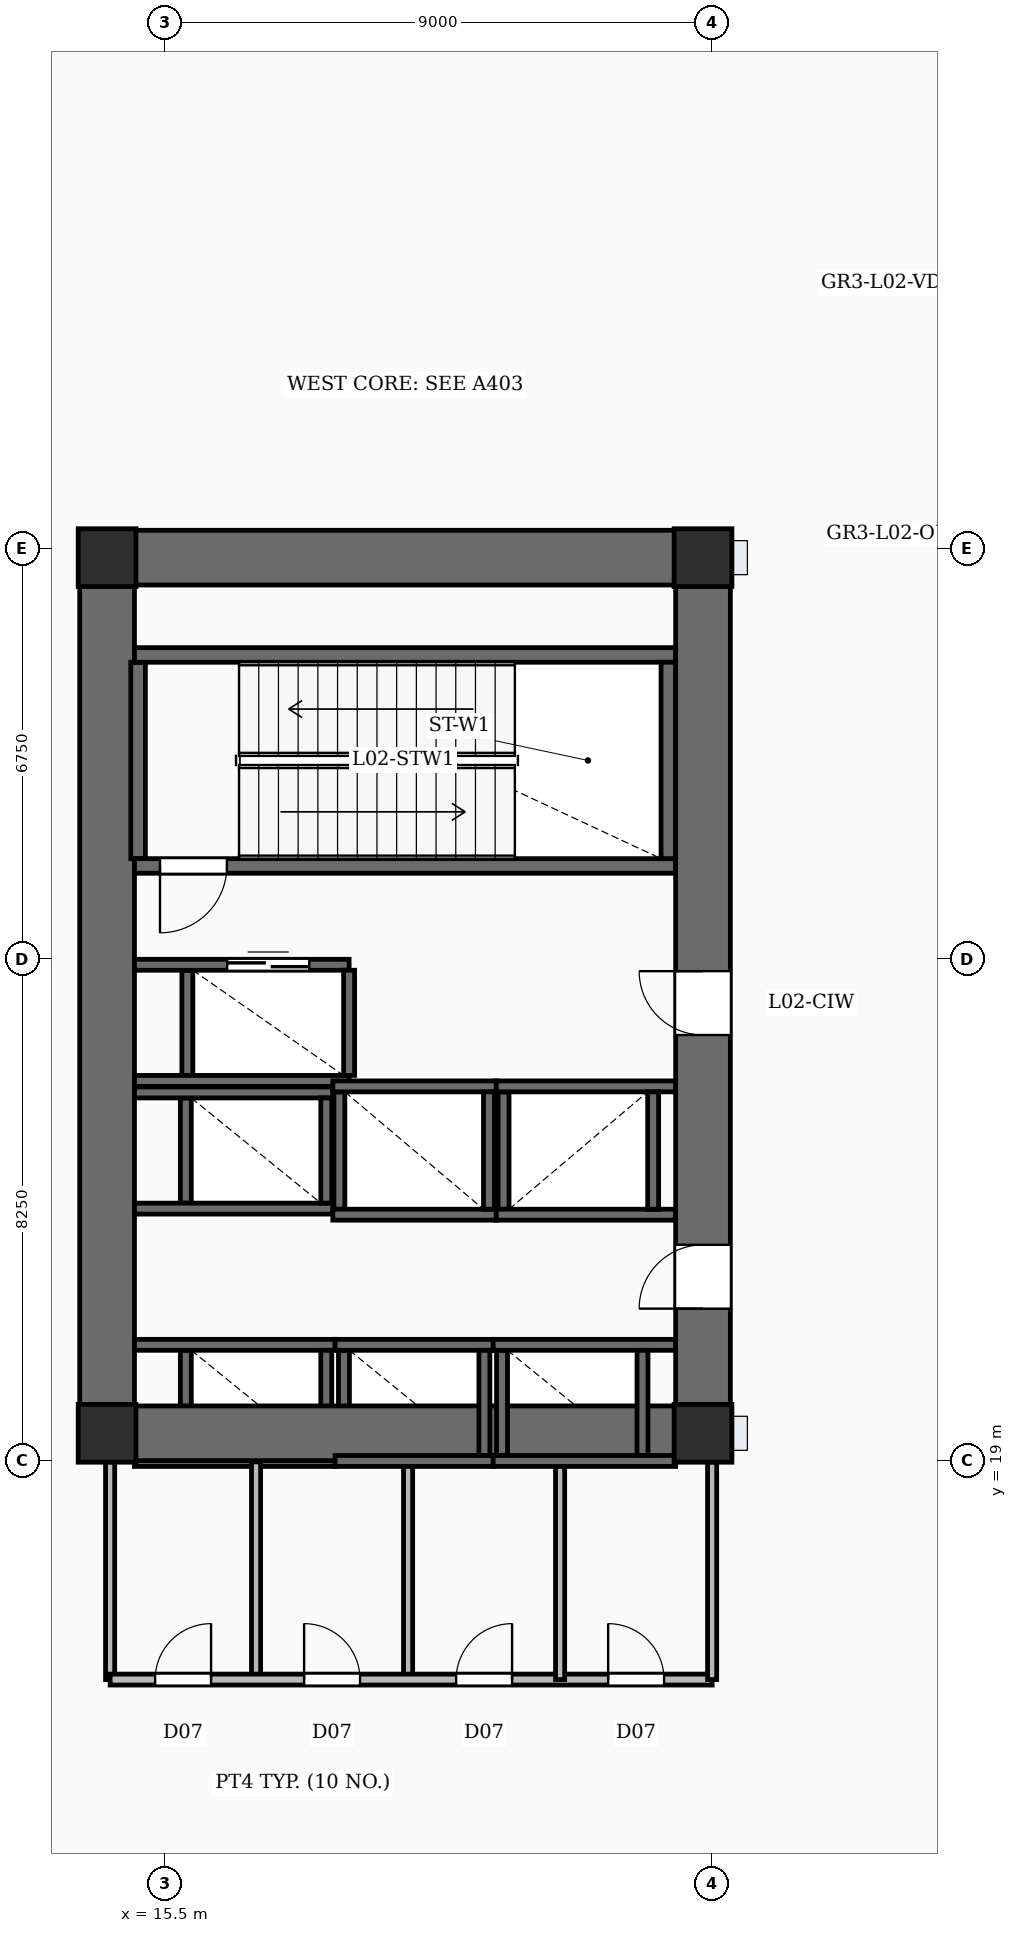
"""IFC4 building model, lengths in metres.
Left out: names, types, materials, properties, quantities, classifications, styles, units other than length and angle.
Written with IfcOpenShell. Run it as: python <this file> out.ifc"""

import sys

from ifc_helpers import new_model, si_unit, direction, frame, frame_2d, origin, origin_2d, place, context, subcontext, project, spatial, rectangle, extrude, element, fill, save


model = new_model("IFC4")
c1 = context("Model", 3, precision=1e-05, world=origin(), true_north=direction((0.0, 1.0)))
c2 = subcontext(c1, "Body", "Model", "MODEL_VIEW")
j1 = project(units=[si_unit("LENGTHUNIT", "METRE"), si_unit("PLANEANGLEUNIT", "RADIAN")], contexts=[c1])
p1 = place(None, origin())
s1 = spatial("IfcSite", under=j1, at=p1, CompositionType="ELEMENT")
p2 = place(p1, origin())
s2 = spatial("IfcBuilding", under=s1, at=p2, CompositionType="ELEMENT")
p3 = place(p2, frame((0.0, 0.0, 13.0)))
s3 = spatial("IfcBuildingStorey", under=s2, at=p3, CompositionType="ELEMENT", Elevation=13.0)
p4 = place(p3, frame((14.55, 19.0, -0.35), z_axis=(0.0, 0.0, 1.0), x_axis=(0.0, 1.0, 0.0)))
e1 = element("IfcWall", 1, at=p4, inside=s3, PredefinedType="SHEAR", context=c2, shape_type="SweptSolid", body=[
    extrude(rectangle(XDim=15.3, YDim=0.9, at=frame_2d((7.65, 0.0))), origin(), (0.0, 0.0, 1.0), 5.0),
])
p5 = place(p3, frame((24.35, 19.0, -0.35), z_axis=(0.0, 0.0, 1.0), x_axis=(0.0, 1.0, 0.0)))
e2 = element("IfcWall", 2, at=p5, inside=s3, PredefinedType="SHEAR", context=c2, shape_type="SweptSolid", body=[
    extrude(rectangle(XDim=15.3, YDim=0.9, at=frame_2d((7.65, 0.0))), origin(), (0.0, 0.0, 1.0), 5.0),
])
p6 = place(p5, frame((2.5, 0.0, 0.35)))
e3 = element("IfcOpeningElement", 3, at=p6, cuts=e2, PredefinedType="OPENING", context=c2, shape_type="SweptSolid", body=[
    extrude(rectangle(XDim=1.05, YDim=2.15, at=frame_2d((0.525, 1.075))), frame((0.0, 0.46, 0.0), z_axis=(0.0, -1.0, 0.0), x_axis=(1.0, 0.0, 0.0)), (0.0, 0.0, 1.0), 0.92),
])
p7 = place(p5, frame((7.0, 0.0, 0.35)))
e4 = element("IfcOpeningElement", 4, at=p7, cuts=e2, PredefinedType="OPENING", context=c2, shape_type="SweptSolid", body=[
    extrude(rectangle(XDim=1.05, YDim=2.15, at=frame_2d((0.525, 1.075))), frame((0.0, 0.46, 0.0), z_axis=(0.0, -1.0, 0.0), x_axis=(1.0, 0.0, 0.0)), (0.0, 0.0, 1.0), 0.92),
])
for number, where, z_axis, x_axis in (
    (5, (15.0, 19.45, -0.35), (0.0, 0.0, 1.0), (1.0, 0.0, 0.0)),
    (6, (15.0, 33.85, -0.35), (0.0, 0.0, 1.0), (1.0, 0.0, 0.0)),
):
    element("IfcWall", number, at=place(p3, frame(where, z_axis=z_axis, x_axis=x_axis)), inside=s3, PredefinedType="SHEAR", context=c2, shape_type="SweptSolid", body=[
        extrude(rectangle(XDim=8.9, YDim=0.9, at=frame_2d((4.45, 0.0))), origin(), (0.0, 0.0, 1.0), 5.0),
    ])
for number, where, z_axis, x_axis in (
    (7, (14.55, 19.45, -0.35), (0.0, 0.0, 1.0), (1.0, 0.0, 0.0)),
    (8, (24.35, 19.45, -0.35), (0.0, 0.0, 1.0), (1.0, 0.0, 0.0)),
    (9, (14.55, 33.85, -0.35), (0.0, 0.0, 1.0), (1.0, 0.0, 0.0)),
    (10, (24.35, 33.85, -0.35), (0.0, 0.0, 1.0), (1.0, 0.0, 0.0)),
):
    element("IfcColumn", number, at=place(p3, frame(where, z_axis=z_axis, x_axis=x_axis)), inside=s3, PredefinedType="COLUMN", context=c2, shape_type="SweptSolid", body=[
        extrude(rectangle(XDim=0.95, YDim=0.95, at=origin_2d()), origin(), (0.0, 0.0, 1.0), 5.0),
    ])
p8 = place(p3, frame((23.9, 28.78, 0.0), z_axis=(0.0, 0.0, 1.0), x_axis=(-1.0, 0.0, 0.0)))
e11 = element("IfcWall", 11, at=p8, inside=s3, PredefinedType="SOLIDWALL", context=c2, shape_type="SweptSolid", body=[
    extrude(rectangle(XDim=8.9, YDim=0.24, at=frame_2d((4.45, 0.0))), origin(), (0.0, 0.0, 1.0), 4.65),
])
p9 = place(p8, frame((7.38, 0.0, 0.0)))
e12 = element("IfcOpeningElement", 12, at=p9, cuts=e11, PredefinedType="OPENING", context=c2, shape_type="SweptSolid", body=[
    extrude(rectangle(XDim=1.1, YDim=2.15, at=frame_2d((0.55, 1.075))), frame((0.0, 0.13, 0.0), z_axis=(0.0, -1.0, 0.0), x_axis=(1.0, 0.0, 0.0)), (0.0, 0.0, 1.0), 0.26),
])
p10 = place(p3, frame((15.0, 32.25, 0.0), z_axis=(0.0, 0.0, 1.0), x_axis=(1.0, 0.0, 0.0)))
e13 = element("IfcWall", 13, at=p10, inside=s3, PredefinedType="SOLIDWALL", context=c2, shape_type="SweptSolid", body=[
    extrude(rectangle(XDim=8.9, YDim=0.24, at=frame_2d((4.45, 0.0))), origin(), (0.0, 0.0, 1.0), 4.65),
])
for number, where, z_axis, x_axis in (
    (14, (15.06, 28.9, 0.0), (0.0, 0.0, 1.0), (0.0, 1.0, 0.0)),
    (15, (23.78, 28.9, 0.0), (0.0, 0.0, 1.0), (0.0, 1.0, 0.0)),
):
    element("IfcWall", number, at=place(p3, frame(where, z_axis=z_axis, x_axis=x_axis)), inside=s3, PredefinedType="SOLIDWALL", context=c2, shape_type="SweptSolid", body=[
        extrude(rectangle(XDim=3.23, YDim=0.24, at=frame_2d((1.615, 0.0))), origin(), (0.0, 0.0, 1.0), 4.65),
    ])
for number, where, z_axis, x_axis in (
    (16, (15.0, 20.905, 0.0), (0.0, 0.0, 1.0), (1.0, 0.0, 0.0)),
    (17, (15.0, 18.995, 0.0), (0.0, 0.0, 1.0), (1.0, 0.0, 0.0)),
):
    element("IfcWall", number, at=place(p3, frame(where, z_axis=z_axis, x_axis=x_axis)), inside=s3, PredefinedType="SOLIDWALL", context=c2, shape_type="SweptSolid", body=[
        extrude(rectangle(XDim=3.3, YDim=0.18, at=frame_2d((1.65, 0.0))), origin(), (0.0, 0.0, 1.0), 4.65),
    ])
for number, where, z_axis, x_axis in (
    (18, (15.845, 19.085, 0.0), (0.0, 0.0, 1.0), (0.0, 1.0, 0.0)),
    (19, (18.155, 19.085, 0.0), (0.0, 0.0, 1.0), (0.0, 1.0, 0.0)),
):
    element("IfcWall", number, at=place(p3, frame(where, z_axis=z_axis, x_axis=x_axis)), inside=s3, PredefinedType="SOLIDWALL", context=c2, shape_type="SweptSolid", body=[
        extrude(rectangle(XDim=1.73, YDim=0.18, at=frame_2d((0.865, 0.0))), origin(), (0.0, 0.0, 1.0), 4.65),
    ])
for number, where, z_axis, x_axis in (
    (20, (18.3, 20.905, 0.0), (0.0, 0.0, 1.0), (1.0, 0.0, 0.0)),
    (21, (18.3, 18.995, 0.0), (0.0, 0.0, 1.0), (1.0, 0.0, 0.0)),
):
    element("IfcWall", number, at=place(p3, frame(where, z_axis=z_axis, x_axis=x_axis)), inside=s3, PredefinedType="SOLIDWALL", context=c2, shape_type="SweptSolid", body=[
        extrude(rectangle(XDim=2.6, YDim=0.18, at=frame_2d((1.3, 0.0))), origin(), (0.0, 0.0, 1.0), 4.65),
    ])
for number, where, z_axis, x_axis in (
    (22, (18.445, 19.085, 0.0), (0.0, 0.0, 1.0), (0.0, 1.0, 0.0)),
    (23, (20.755, 19.085, 0.0), (0.0, 0.0, 1.0), (0.0, 1.0, 0.0)),
):
    element("IfcWall", number, at=place(p3, frame(where, z_axis=z_axis, x_axis=x_axis)), inside=s3, PredefinedType="SOLIDWALL", context=c2, shape_type="SweptSolid", body=[
        extrude(rectangle(XDim=1.73, YDim=0.18, at=frame_2d((0.865, 0.0))), origin(), (0.0, 0.0, 1.0), 4.65),
    ])
for number, where, z_axis, x_axis in (
    (24, (20.9, 20.905, 0.0), (0.0, 0.0, 1.0), (1.0, 0.0, 0.0)),
    (25, (20.9, 18.995, 0.0), (0.0, 0.0, 1.0), (1.0, 0.0, 0.0)),
):
    element("IfcWall", number, at=place(p3, frame(where, z_axis=z_axis, x_axis=x_axis)), inside=s3, PredefinedType="SOLIDWALL", context=c2, shape_type="SweptSolid", body=[
        extrude(rectangle(XDim=3.0, YDim=0.18, at=frame_2d((1.5, 0.0))), origin(), (0.0, 0.0, 1.0), 4.65),
    ])
for number, where, z_axis, x_axis in (
    (26, (21.045, 19.085, 0.0), (0.0, 0.0, 1.0), (0.0, 1.0, 0.0)),
    (27, (23.355, 19.085, 0.0), (0.0, 0.0, 1.0), (0.0, 1.0, 0.0)),
):
    element("IfcWall", number, at=place(p3, frame(where, z_axis=z_axis, x_axis=x_axis)), inside=s3, PredefinedType="SOLIDWALL", context=c2, shape_type="SweptSolid", body=[
        extrude(rectangle(XDim=1.73, YDim=0.18, at=frame_2d((0.865, 0.0))), origin(), (0.0, 0.0, 1.0), 4.65),
    ])
for number, where, z_axis, x_axis in (
    (28, (15.0, 25.055, 0.0), (0.0, 0.0, 1.0), (1.0, 0.0, 0.0)),
    (29, (15.0, 23.145, 0.0), (0.0, 0.0, 1.0), (1.0, 0.0, 0.0)),
):
    element("IfcWall", number, at=place(p3, frame(where, z_axis=z_axis, x_axis=x_axis)), inside=s3, PredefinedType="SOLIDWALL", context=c2, shape_type="SweptSolid", body=[
        extrude(rectangle(XDim=3.262, YDim=0.18, at=frame_2d((1.631, 0.0))), origin(), (0.0, 0.0, 1.0), 4.65),
    ])
for number, where, z_axis, x_axis in (
    (30, (15.845, 23.235, 0.0), (0.0, 0.0, 1.0), (0.0, 1.0, 0.0)),
    (31, (18.155, 23.235, 0.0), (0.0, 0.0, 1.0), (0.0, 1.0, 0.0)),
):
    element("IfcWall", number, at=place(p3, frame(where, z_axis=z_axis, x_axis=x_axis)), inside=s3, PredefinedType="SOLIDWALL", context=c2, shape_type="SweptSolid", body=[
        extrude(rectangle(XDim=1.73, YDim=0.18, at=frame_2d((0.865, 0.0))), origin(), (0.0, 0.0, 1.0), 4.65),
    ])
for number, where, z_axis, x_axis in (
    (32, (18.262, 25.155, 0.0), (0.0, 0.0, 1.0), (1.0, 0.0, 0.0)),
    (33, (18.262, 23.045, 0.0), (0.0, 0.0, 1.0), (1.0, 0.0, 0.0)),
):
    element("IfcWall", number, at=place(p3, frame(where, z_axis=z_axis, x_axis=x_axis)), inside=s3, PredefinedType="SOLIDWALL", context=c2, shape_type="SweptSolid", body=[
        extrude(rectangle(XDim=2.688, YDim=0.18, at=frame_2d((1.344, 0.0))), origin(), (0.0, 0.0, 1.0), 4.65),
    ])
for number, where, z_axis, x_axis in (
    (34, (18.37, 23.135, 0.0), (0.0, 0.0, 1.0), (0.0, 1.0, 0.0)),
    (35, (20.83, 23.135, 0.0), (0.0, 0.0, 1.0), (0.0, 1.0, 0.0)),
):
    element("IfcWall", number, at=place(p3, frame(where, z_axis=z_axis, x_axis=x_axis)), inside=s3, PredefinedType="SOLIDWALL", context=c2, shape_type="SweptSolid", body=[
        extrude(rectangle(XDim=1.93, YDim=0.18, at=frame_2d((0.965, 0.0))), origin(), (0.0, 0.0, 1.0), 4.65),
    ])
for number, where, z_axis, x_axis in (
    (36, (20.95, 25.155, 0.0), (0.0, 0.0, 1.0), (1.0, 0.0, 0.0)),
    (37, (20.95, 23.045, 0.0), (0.0, 0.0, 1.0), (1.0, 0.0, 0.0)),
):
    element("IfcWall", number, at=place(p3, frame(where, z_axis=z_axis, x_axis=x_axis)), inside=s3, PredefinedType="SOLIDWALL", context=c2, shape_type="SweptSolid", body=[
        extrude(rectangle(XDim=2.95, YDim=0.18, at=frame_2d((1.475, 0.0))), origin(), (0.0, 0.0, 1.0), 4.65),
    ])
for number, where, z_axis, x_axis in (
    (38, (21.07, 23.135, 0.0), (0.0, 0.0, 1.0), (0.0, 1.0, 0.0)),
    (39, (23.53, 23.135, 0.0), (0.0, 0.0, 1.0), (0.0, 1.0, 0.0)),
):
    element("IfcWall", number, at=place(p3, frame(where, z_axis=z_axis, x_axis=x_axis)), inside=s3, PredefinedType="SOLIDWALL", context=c2, shape_type="SweptSolid", body=[
        extrude(rectangle(XDim=1.93, YDim=0.18, at=frame_2d((0.965, 0.0))), origin(), (0.0, 0.0, 1.0), 4.65),
    ])
p11 = place(p3, frame((15.0, 27.155, 0.0), z_axis=(0.0, 0.0, 1.0), x_axis=(1.0, 0.0, 0.0)))
e40 = element("IfcWall", 40, at=p11, inside=s3, PredefinedType="SOLIDWALL", context=c2, shape_type="SweptSolid", body=[
    extrude(rectangle(XDim=3.53, YDim=0.18, at=frame_2d((1.765, 0.0))), origin(), (0.0, 0.0, 1.0), 4.65),
])
p12 = place(p11, frame((1.525, 0.0, 0.0)))
e41 = element("IfcOpeningElement", 41, at=p12, cuts=e40, PredefinedType="OPENING", context=c2, shape_type="SweptSolid", body=[
    extrude(rectangle(XDim=1.35, YDim=2.3, at=frame_2d((0.675, 1.15))), frame((0.0, 0.1, 0.0), z_axis=(0.0, -1.0, 0.0), x_axis=(1.0, 0.0, 0.0)), (0.0, 0.0, 1.0), 0.2),
])
p13 = place(p3, frame((15.0, 25.245, 0.0), z_axis=(0.0, 0.0, 1.0), x_axis=(1.0, 0.0, 0.0)))
e42 = element("IfcWall", 42, at=p13, inside=s3, PredefinedType="SOLIDWALL", context=c2, shape_type="SweptSolid", body=[
    extrude(rectangle(XDim=3.53, YDim=0.18, at=frame_2d((1.765, 0.0))), origin(), (0.0, 0.0, 1.0), 4.65),
])
for number, where, z_axis, x_axis in (
    (43, (15.87, 25.335, 0.0), (0.0, 0.0, 1.0), (0.0, 1.0, 0.0)),
    (44, (18.53, 25.335, 0.0), (0.0, 0.0, 1.0), (0.0, 1.0, 0.0)),
):
    element("IfcWall", number, at=place(p3, frame(where, z_axis=z_axis, x_axis=x_axis)), inside=s3, PredefinedType="SOLIDWALL", context=c2, shape_type="SweptSolid", body=[
        extrude(rectangle(XDim=1.73, YDim=0.18, at=frame_2d((0.865, 0.0))), origin(), (0.0, 0.0, 1.0), 4.65),
    ])
for number, where, z_axis, x_axis in (
    (45, (17.0, 15.4, 0.0), (0.0, 0.0, 1.0), (0.0, 1.0, 0.0)),
    (46, (19.5, 15.4, 0.0), (0.0, 0.0, 1.0), (0.0, 1.0, 0.0)),
    (47, (22.0, 15.4, 0.0), (0.0, 0.0, 1.0), (0.0, 1.0, 0.0)),
):
    element("IfcWall", number, at=place(p3, frame(where, z_axis=z_axis, x_axis=x_axis)), inside=s3, PredefinedType="PARTITIONING", context=c2, shape_type="SweptSolid", body=[
        extrude(rectangle(XDim=3.58, YDim=0.15, at=frame_2d((1.79, 0.0))), origin(), (0.0, 0.0, 1.0), 3.71),
    ])
p14 = place(p3, frame((14.6, 15.4, 0.0), z_axis=(0.0, 0.0, 1.0), x_axis=(1.0, 0.0, 0.0)))
e48 = element("IfcWall", 48, at=p14, inside=s3, PredefinedType="PARTITIONING", context=c2, shape_type="SweptSolid", body=[
    extrude(rectangle(XDim=9.9, YDim=0.18, at=frame_2d((4.95, 0.0))), origin(), (0.0, 0.0, 1.0), 3.71),
])
p15 = place(p14, frame((0.74, 0.0, 0.0)))
e49 = element("IfcOpeningElement", 49, at=p15, cuts=e48, PredefinedType="OPENING", context=c2, shape_type="SweptSolid", body=[
    extrude(rectangle(XDim=0.92, YDim=2.1, at=frame_2d((0.46, 1.05))), frame((0.0, 0.1, 0.0), z_axis=(0.0, -1.0, 0.0), x_axis=(1.0, 0.0, 0.0)), (0.0, 0.0, 1.0), 0.2),
])
p16 = place(p14, frame((3.19, 0.0, 0.0)))
e50 = element("IfcOpeningElement", 50, at=p16, cuts=e48, PredefinedType="OPENING", context=c2, shape_type="SweptSolid", body=[
    extrude(rectangle(XDim=0.92, YDim=2.1, at=frame_2d((0.46, 1.05))), frame((0.0, 0.1, 0.0), z_axis=(0.0, -1.0, 0.0), x_axis=(1.0, 0.0, 0.0)), (0.0, 0.0, 1.0), 0.2),
])
p17 = place(p14, frame((5.69, 0.0, 0.0)))
e51 = element("IfcOpeningElement", 51, at=p17, cuts=e48, PredefinedType="OPENING", context=c2, shape_type="SweptSolid", body=[
    extrude(rectangle(XDim=0.92, YDim=2.1, at=frame_2d((0.46, 1.05))), frame((0.0, 0.1, 0.0), z_axis=(0.0, -1.0, 0.0), x_axis=(1.0, 0.0, 0.0)), (0.0, 0.0, 1.0), 0.2),
])
p18 = place(p14, frame((8.19, 0.0, 0.0)))
e52 = element("IfcOpeningElement", 52, at=p18, cuts=e48, PredefinedType="OPENING", context=c2, shape_type="SweptSolid", body=[
    extrude(rectangle(XDim=0.92, YDim=2.1, at=frame_2d((0.46, 1.05))), frame((0.0, 0.1, 0.0), z_axis=(0.0, -1.0, 0.0), x_axis=(1.0, 0.0, 0.0)), (0.0, 0.0, 1.0), 0.2),
])
for number, where, z_axis, x_axis in (
    (53, (14.6, 15.4, 0.0), (0.0, 0.0, 1.0), (0.0, 1.0, 0.0)),
    (54, (24.5, 15.4, 0.0), (0.0, 0.0, 1.0), (0.0, 1.0, 0.0)),
):
    element("IfcWall", number, at=place(p3, frame(where, z_axis=z_axis, x_axis=x_axis)), inside=s3, PredefinedType="PARTITIONING", context=c2, shape_type="SweptSolid", body=[
        extrude(rectangle(XDim=3.58, YDim=0.15, at=frame_2d((1.79, 0.0))), origin(), (0.0, 0.0, 1.0), 3.71),
    ])
p19 = place(p6, origin())
e55 = element("IfcDoor", 55, at=p19, inside=s3, OperationType="SINGLE_SWING_LEFT", PredefinedType="DOOR", context=c2, shape_type="SweptSolid", body=[
    extrude(rectangle(XDim=1.05, YDim=2.15, at=frame_2d((0.525, 1.075))), frame((0.0, 0.025, 0.0), z_axis=(0.0, -1.0, 0.0), x_axis=(1.0, 0.0, 0.0)), (0.0, 0.0, 1.0), 0.05),
])
fill(e3, e55)
p20 = place(p7, origin())
e56 = element("IfcDoor", 56, at=p20, inside=s3, OperationType="SINGLE_SWING_RIGHT", PredefinedType="DOOR", context=c2, shape_type="SweptSolid", body=[
    extrude(rectangle(XDim=1.05, YDim=2.15, at=frame_2d((0.525, 1.075))), frame((0.0, 0.025, 0.0), z_axis=(0.0, -1.0, 0.0), x_axis=(1.0, 0.0, 0.0)), (0.0, 0.0, 1.0), 0.05),
])
fill(e4, e56)
p21 = place(p9, origin())
e57 = element("IfcDoor", 57, at=p21, inside=s3, OperationType="SINGLE_SWING_RIGHT", PredefinedType="DOOR", context=c2, shape_type="SweptSolid", body=[
    extrude(rectangle(XDim=1.1, YDim=2.15, at=frame_2d((0.55, 1.075))), frame((0.0, 0.025, 0.0), z_axis=(0.0, -1.0, 0.0), x_axis=(1.0, 0.0, 0.0)), (0.0, 0.0, 1.0), 0.05),
])
fill(e12, e57)
p22 = place(p12, origin())
e58 = element("IfcDoor", 58, at=p22, inside=s3, OperationType="DOUBLE_DOOR_SLIDING", PredefinedType="DOOR", context=c2, shape_type="SweptSolid", body=[
    extrude(rectangle(XDim=1.35, YDim=2.3, at=frame_2d((0.675, 1.15))), frame((0.0, 0.025, 0.0), z_axis=(0.0, -1.0, 0.0), x_axis=(1.0, 0.0, 0.0)), (0.0, 0.0, 1.0), 0.05),
])
fill(e41, e58)
p23 = place(p15, origin())
e59 = element("IfcDoor", 59, at=p23, inside=s3, OperationType="SINGLE_SWING_RIGHT", PredefinedType="DOOR", context=c2, shape_type="SweptSolid", body=[
    extrude(rectangle(XDim=0.92, YDim=2.1, at=frame_2d((0.46, 1.05))), frame((0.0, 0.025, 0.0), z_axis=(0.0, -1.0, 0.0), x_axis=(1.0, 0.0, 0.0)), (0.0, 0.0, 1.0), 0.05),
])
fill(e49, e59)
p24 = place(p16, origin())
e60 = element("IfcDoor", 60, at=p24, inside=s3, OperationType="SINGLE_SWING_LEFT", PredefinedType="DOOR", context=c2, shape_type="SweptSolid", body=[
    extrude(rectangle(XDim=0.92, YDim=2.1, at=frame_2d((0.46, 1.05))), frame((0.0, 0.025, 0.0), z_axis=(0.0, -1.0, 0.0), x_axis=(1.0, 0.0, 0.0)), (0.0, 0.0, 1.0), 0.05),
])
fill(e50, e60)
p25 = place(p17, origin())
e61 = element("IfcDoor", 61, at=p25, inside=s3, OperationType="SINGLE_SWING_RIGHT", PredefinedType="DOOR", context=c2, shape_type="SweptSolid", body=[
    extrude(rectangle(XDim=0.92, YDim=2.1, at=frame_2d((0.46, 1.05))), frame((0.0, 0.025, 0.0), z_axis=(0.0, -1.0, 0.0), x_axis=(1.0, 0.0, 0.0)), (0.0, 0.0, 1.0), 0.05),
])
fill(e51, e61)
p26 = place(p18, origin())
e62 = element("IfcDoor", 62, at=p26, inside=s3, OperationType="SINGLE_SWING_LEFT", PredefinedType="DOOR", context=c2, shape_type="SweptSolid", body=[
    extrude(rectangle(XDim=0.92, YDim=2.1, at=frame_2d((0.46, 1.05))), frame((0.0, 0.025, 0.0), z_axis=(0.0, -1.0, 0.0), x_axis=(1.0, 0.0, 0.0)), (0.0, 0.0, 1.0), 0.05),
])
fill(e52, e62)
save(model, sys.argv[1])
